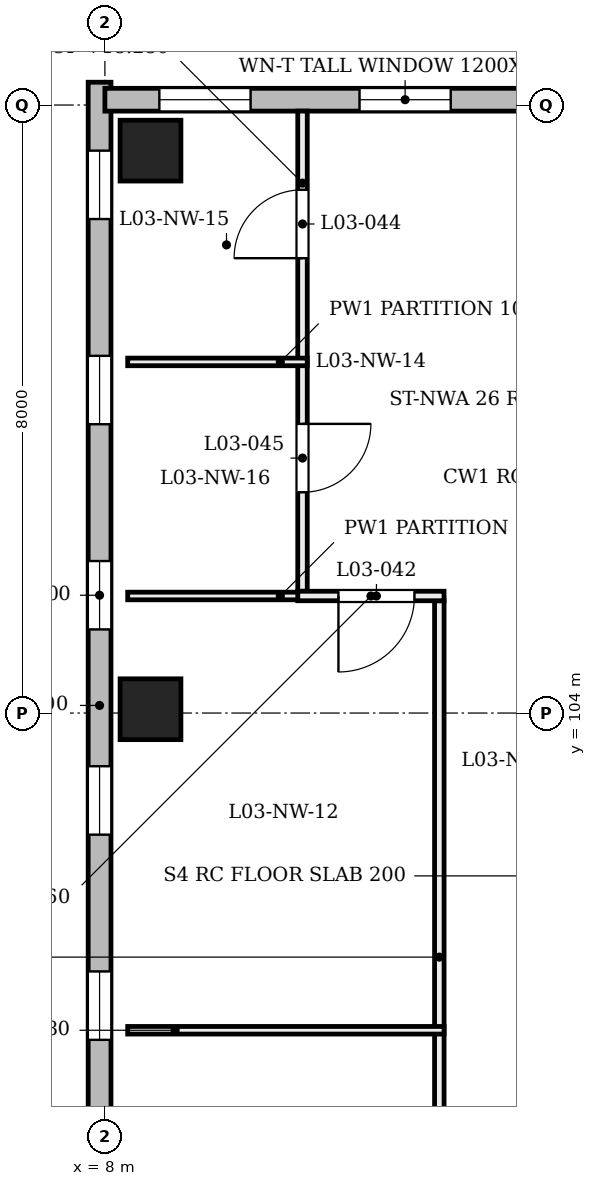
"""IFC4 building model, lengths in metres.
Left out: names, types, materials, properties, quantities, classifications, styles, units other than length and angle.
Written with IfcOpenShell. Run it as: python <this file> out.ifc"""

import sys

from ifc_helpers import new_model, si_unit, direction, frame, frame_2d, origin, origin_2d, place, context, subcontext, project, spatial, rectangle, extrude, element, fill, save


model = new_model("IFC4")
c1 = context("Model", 3, precision=1e-05, world=origin(), true_north=direction((0.0, 1.0)))
c2 = subcontext(c1, "Body", "Model", "MODEL_VIEW")
j1 = project(units=[si_unit("LENGTHUNIT", "METRE"), si_unit("PLANEANGLEUNIT", "RADIAN")], contexts=[c1])
p1 = place(None, origin())
s1 = spatial("IfcSite", under=j1, at=p1, CompositionType="ELEMENT")
p2 = place(p1, origin())
s2 = spatial("IfcBuilding", under=s1, at=p2, CompositionType="ELEMENT")
p3 = place(p2, frame((0.0, 0.0, 14.4)))
s3 = spatial("IfcBuildingStorey", under=s2, at=p3, CompositionType="ELEMENT", Elevation=14.4)
for number, where, z_axis, x_axis in (
    (1, (8.6, 104.05, 0.0), (0.0, 0.0, 1.0), (1.0, 0.0, 0.0)),
    (2, (8.6, 111.4, 0.0), (0.0, 0.0, 1.0), (1.0, 0.0, 0.0)),
):
    element("IfcColumn", number, at=place(p3, frame(where, z_axis=z_axis, x_axis=x_axis)), inside=s3, PredefinedType="COLUMN", context=c2, shape_type="SweptSolid", body=[
        extrude(rectangle(XDim=0.8, YDim=0.8, at=origin_2d()), origin(), (0.0, 0.0, 1.0), 4.8),
    ])
p4 = place(p3, frame((7.93, 95.9, 0.0), z_axis=(0.0, 0.0, 1.0), x_axis=(0.0, 1.0, 0.0)))
e3 = element("IfcWall", 3, at=p4, inside=s3, PredefinedType="SOLIDWALL", context=c2, shape_type="SweptSolid", body=[
    extrude(rectangle(XDim=16.4, YDim=0.3, at=frame_2d((8.2, 0.0))), origin(), (0.0, 0.0, 1.0), 3.9),
])
p5 = place(p4, frame((1.1, 0.0, 0.75)))
e4 = element("IfcOpeningElement", 4, at=p5, cuts=e3, PredefinedType="OPENING", context=c2, shape_type="SweptSolid", body=[
    extrude(rectangle(XDim=0.9, YDim=3.1, at=frame_2d((0.45, 1.55))), frame((0.0, 0.16, 0.0), z_axis=(0.0, -1.0, 0.0), x_axis=(1.0, 0.0, 0.0)), (0.0, 0.0, 1.0), 0.32),
])
p6 = place(p4, frame((3.8, 0.0, 0.75)))
e5 = element("IfcOpeningElement", 5, at=p6, cuts=e3, PredefinedType="OPENING", context=c2, shape_type="SweptSolid", body=[
    extrude(rectangle(XDim=0.9, YDim=3.1, at=frame_2d((0.45, 1.55))), frame((0.0, 0.16, 0.0), z_axis=(0.0, -1.0, 0.0), x_axis=(1.0, 0.0, 0.0)), (0.0, 0.0, 1.0), 0.32),
])
p7 = place(p4, frame((6.5, 0.0, 0.75)))
e6 = element("IfcOpeningElement", 6, at=p7, cuts=e3, PredefinedType="OPENING", context=c2, shape_type="SweptSolid", body=[
    extrude(rectangle(XDim=0.9, YDim=3.1, at=frame_2d((0.45, 1.55))), frame((0.0, 0.16, 0.0), z_axis=(0.0, -1.0, 0.0), x_axis=(1.0, 0.0, 0.0)), (0.0, 0.0, 1.0), 0.32),
])
p8 = place(p4, frame((9.2, 0.0, 0.75)))
e7 = element("IfcOpeningElement", 7, at=p8, cuts=e3, PredefinedType="OPENING", context=c2, shape_type="SweptSolid", body=[
    extrude(rectangle(XDim=0.9, YDim=3.1, at=frame_2d((0.45, 1.55))), frame((0.0, 0.16, 0.0), z_axis=(0.0, -1.0, 0.0), x_axis=(1.0, 0.0, 0.0)), (0.0, 0.0, 1.0), 0.32),
])
p9 = place(p4, frame((11.9, 0.0, 0.75)))
e8 = element("IfcOpeningElement", 8, at=p9, cuts=e3, PredefinedType="OPENING", context=c2, shape_type="SweptSolid", body=[
    extrude(rectangle(XDim=0.9, YDim=3.1, at=frame_2d((0.45, 1.55))), frame((0.0, 0.16, 0.0), z_axis=(0.0, -1.0, 0.0), x_axis=(1.0, 0.0, 0.0)), (0.0, 0.0, 1.0), 0.32),
])
p10 = place(p4, frame((14.6, 0.0, 0.75)))
e9 = element("IfcOpeningElement", 9, at=p10, cuts=e3, PredefinedType="OPENING", context=c2, shape_type="SweptSolid", body=[
    extrude(rectangle(XDim=0.9, YDim=3.1, at=frame_2d((0.45, 1.55))), frame((0.0, 0.16, 0.0), z_axis=(0.0, -1.0, 0.0), x_axis=(1.0, 0.0, 0.0)), (0.0, 0.0, 1.0), 0.32),
])
p11 = place(p3, frame((8.0, 112.07, 0.0), z_axis=(0.0, 0.0, 1.0), x_axis=(1.0, 0.0, 0.0)))
e10 = element("IfcWall", 10, at=p11, inside=s3, PredefinedType="SOLIDWALL", context=c2, shape_type="SweptSolid", body=[
    extrude(rectangle(XDim=7.9, YDim=0.3, at=frame_2d((3.95, 0.0))), origin(), (0.0, 0.0, 1.0), 3.9),
])
p12 = place(p11, frame((0.717, 0.0, 0.75)))
e11 = element("IfcOpeningElement", 11, at=p12, cuts=e10, PredefinedType="OPENING", context=c2, shape_type="SweptSolid", body=[
    extrude(rectangle(XDim=1.2, YDim=3.1, at=frame_2d((0.6, 1.55))), frame((0.0, 0.16, 0.0), z_axis=(0.0, -1.0, 0.0), x_axis=(1.0, 0.0, 0.0)), (0.0, 0.0, 1.0), 0.32),
])
p13 = place(p11, frame((3.35, 0.0, 0.75)))
e12 = element("IfcOpeningElement", 12, at=p13, cuts=e10, PredefinedType="OPENING", context=c2, shape_type="SweptSolid", body=[
    extrude(rectangle(XDim=1.2, YDim=3.1, at=frame_2d((0.6, 1.55))), frame((0.0, 0.16, 0.0), z_axis=(0.0, -1.0, 0.0), x_axis=(1.0, 0.0, 0.0)), (0.0, 0.0, 1.0), 0.32),
])
p14 = place(p11, frame((5.983, 0.0, 0.75)))
e13 = element("IfcOpeningElement", 13, at=p14, cuts=e10, PredefinedType="OPENING", context=c2, shape_type="SweptSolid", body=[
    extrude(rectangle(XDim=1.2, YDim=3.1, at=frame_2d((0.6, 1.55))), frame((0.0, 0.16, 0.0), z_axis=(0.0, -1.0, 0.0), x_axis=(1.0, 0.0, 0.0)), (0.0, 0.0, 1.0), 0.32),
])
p15 = place(p3, frame((12.4, 96.1, 0.0), z_axis=(0.0, 0.0, 1.0), x_axis=(0.0, 1.0, 0.0)))
e14 = element("IfcWall", 14, at=p15, inside=s3, PredefinedType="PARTITIONING", context=c2, shape_type="SweptSolid", body=[
    extrude(rectangle(XDim=9.377, YDim=0.125, at=frame_2d((4.688, 0.0))), origin(), (0.0, 0.0, 1.0), 3.88),
])
p16 = place(p15, frame((1.551, 0.0, 0.0)))
e15 = element("IfcOpeningElement", 15, at=p16, cuts=e14, PredefinedType="OPENING", context=c2, shape_type="SweptSolid", body=[
    extrude(rectangle(XDim=1.0, YDim=2.1, at=frame_2d((0.5, 1.05))), frame((0.0, 0.073, 0.0), z_axis=(0.0, -1.0, 0.0), x_axis=(1.0, 0.0, 0.0)), (0.0, 0.0, 1.0), 0.145),
])
p17 = place(p3, frame((10.6, 105.602, 0.0), z_axis=(0.0, 0.0, 1.0), x_axis=(0.0, 1.0, 0.0)))
e16 = element("IfcWall", 16, at=p17, inside=s3, PredefinedType="PARTITIONING", context=c2, shape_type="SweptSolid", body=[
    extrude(rectangle(XDim=6.318, YDim=0.125, at=frame_2d((3.159, 0.0))), origin(), (0.0, 0.0, 1.0), 3.88),
])
p18 = place(p17, frame((4.383, 0.0, 0.0)))
e17 = element("IfcOpeningElement", 17, at=p18, cuts=e16, PredefinedType="OPENING", context=c2, shape_type="SweptSolid", body=[
    extrude(rectangle(XDim=0.9, YDim=2.1, at=frame_2d((0.45, 1.05))), frame((0.0, 0.073, 0.0), z_axis=(0.0, -1.0, 0.0), x_axis=(1.0, 0.0, 0.0)), (0.0, 0.0, 1.0), 0.145),
])
p19 = place(p17, frame((1.302, 0.0, 0.0)))
e18 = element("IfcOpeningElement", 18, at=p19, cuts=e16, PredefinedType="OPENING", context=c2, shape_type="SweptSolid", body=[
    extrude(rectangle(XDim=0.9, YDim=2.1, at=frame_2d((0.45, 1.05))), frame((0.0, 0.073, 0.0), z_axis=(0.0, -1.0, 0.0), x_axis=(1.0, 0.0, 0.0)), (0.0, 0.0, 1.0), 0.145),
])
p20 = place(p3, frame((8.3, 99.826, 0.0), z_axis=(0.0, 0.0, 1.0), x_axis=(1.0, 0.0, 0.0)))
e19 = element("IfcWall", 19, at=p20, inside=s3, PredefinedType="PARTITIONING", context=c2, shape_type="SweptSolid", body=[
    extrude(rectangle(XDim=4.162, YDim=0.1, at=frame_2d((2.081, 0.0))), origin(), (0.0, 0.0, 1.0), 3.98),
])
p21 = place(p3, frame((8.3, 105.54, 0.0), z_axis=(0.0, 0.0, 1.0), x_axis=(1.0, 0.0, 0.0)))
e20 = element("IfcWall", 20, at=p21, inside=s3, PredefinedType="PARTITIONING", context=c2, shape_type="SweptSolid", body=[
    extrude(rectangle(XDim=2.363, YDim=0.1, at=frame_2d((1.181, 0.0))), origin(), (0.0, 0.0, 1.0), 3.98),
])
p22 = place(p3, frame((10.538, 105.54, 0.0), z_axis=(0.0, 0.0, 1.0), x_axis=(1.0, 0.0, 0.0)))
e21 = element("IfcWall", 21, at=p22, inside=s3, PredefinedType="PARTITIONING", context=c2, shape_type="SweptSolid", body=[
    extrude(rectangle(XDim=1.925, YDim=0.125, at=frame_2d((0.962, 0.0))), origin(), (0.0, 0.0, 1.0), 4.56),
])
p23 = place(p22, frame((0.535, 0.0, 0.0)))
e22 = element("IfcOpeningElement", 22, at=p23, cuts=e21, PredefinedType="OPENING", context=c2, shape_type="SweptSolid", body=[
    extrude(rectangle(XDim=1.0, YDim=2.1, at=frame_2d((0.5, 1.05))), frame((0.0, 0.073, 0.0), z_axis=(0.0, -1.0, 0.0), x_axis=(1.0, 0.0, 0.0)), (0.0, 0.0, 1.0), 0.145),
])
p24 = place(p3, frame((8.3, 108.62, 0.0), z_axis=(0.0, 0.0, 1.0), x_axis=(1.0, 0.0, 0.0)))
e23 = element("IfcWall", 23, at=p24, inside=s3, PredefinedType="PARTITIONING", context=c2, shape_type="SweptSolid", body=[
    extrude(rectangle(XDim=2.363, YDim=0.1, at=frame_2d((1.181, 0.0))), origin(), (0.0, 0.0, 1.0), 3.98),
])
p25 = place(p6, origin())
e24 = element("IfcWindow", 24, at=p25, inside=s3, PartitioningType="SINGLE_PANEL", PredefinedType="WINDOW", context=c2, shape_type="SweptSolid", body=[
    extrude(rectangle(XDim=0.9, YDim=3.1, at=frame_2d((0.45, 1.55))), frame((0.0, 0.03, 0.0), z_axis=(0.0, -1.0, 0.0), x_axis=(1.0, 0.0, 0.0)), (0.0, 0.0, 1.0), 0.06),
])
fill(e5, e24)
p26 = place(p7, origin())
e25 = element("IfcWindow", 25, at=p26, inside=s3, PartitioningType="SINGLE_PANEL", PredefinedType="WINDOW", context=c2, shape_type="SweptSolid", body=[
    extrude(rectangle(XDim=0.9, YDim=3.1, at=frame_2d((0.45, 1.55))), frame((0.0, 0.03, 0.0), z_axis=(0.0, -1.0, 0.0), x_axis=(1.0, 0.0, 0.0)), (0.0, 0.0, 1.0), 0.06),
])
fill(e6, e25)
p27 = place(p8, origin())
e26 = element("IfcWindow", 26, at=p27, inside=s3, PartitioningType="SINGLE_PANEL", PredefinedType="WINDOW", context=c2, shape_type="SweptSolid", body=[
    extrude(rectangle(XDim=0.9, YDim=3.1, at=frame_2d((0.45, 1.55))), frame((0.0, 0.03, 0.0), z_axis=(0.0, -1.0, 0.0), x_axis=(1.0, 0.0, 0.0)), (0.0, 0.0, 1.0), 0.06),
])
fill(e7, e26)
p28 = place(p9, origin())
e27 = element("IfcWindow", 27, at=p28, inside=s3, PartitioningType="SINGLE_PANEL", PredefinedType="WINDOW", context=c2, shape_type="SweptSolid", body=[
    extrude(rectangle(XDim=0.9, YDim=3.1, at=frame_2d((0.45, 1.55))), frame((0.0, 0.03, 0.0), z_axis=(0.0, -1.0, 0.0), x_axis=(1.0, 0.0, 0.0)), (0.0, 0.0, 1.0), 0.06),
])
fill(e8, e27)
p29 = place(p10, origin())
e28 = element("IfcWindow", 28, at=p29, inside=s3, PartitioningType="SINGLE_PANEL", PredefinedType="WINDOW", context=c2, shape_type="SweptSolid", body=[
    extrude(rectangle(XDim=0.9, YDim=3.1, at=frame_2d((0.45, 1.55))), frame((0.0, 0.03, 0.0), z_axis=(0.0, -1.0, 0.0), x_axis=(1.0, 0.0, 0.0)), (0.0, 0.0, 1.0), 0.06),
])
fill(e9, e28)
p30 = place(p12, origin())
e29 = element("IfcWindow", 29, at=p30, inside=s3, PartitioningType="SINGLE_PANEL", PredefinedType="WINDOW", context=c2, shape_type="SweptSolid", body=[
    extrude(rectangle(XDim=1.2, YDim=3.1, at=frame_2d((0.6, 1.55))), frame((0.0, 0.03, 0.0), z_axis=(0.0, -1.0, 0.0), x_axis=(1.0, 0.0, 0.0)), (0.0, 0.0, 1.0), 0.06),
])
fill(e11, e29)
p31 = place(p13, origin())
e30 = element("IfcWindow", 30, at=p31, inside=s3, PartitioningType="SINGLE_PANEL", PredefinedType="WINDOW", context=c2, shape_type="SweptSolid", body=[
    extrude(rectangle(XDim=1.2, YDim=3.1, at=frame_2d((0.6, 1.55))), frame((0.0, 0.03, 0.0), z_axis=(0.0, -1.0, 0.0), x_axis=(1.0, 0.0, 0.0)), (0.0, 0.0, 1.0), 0.06),
])
fill(e12, e30)
p32 = place(p23, frame((1.0, 0.0, 0.0), z_axis=(0.0, 0.0, 1.0), x_axis=(-1.0, 0.0, 0.0)))
e31 = element("IfcDoor", 31, at=p32, inside=s3, OperationType="SINGLE_SWING_LEFT", PredefinedType="DOOR", context=c2, shape_type="SweptSolid", body=[
    extrude(rectangle(XDim=1.0, YDim=2.1, at=frame_2d((0.5, 1.05))), frame((0.0, 0.025, 0.0), z_axis=(0.0, -1.0, 0.0), x_axis=(1.0, 0.0, 0.0)), (0.0, 0.0, 1.0), 0.05),
])
fill(e22, e31)
p33 = place(p18, origin())
e32 = element("IfcDoor", 32, at=p33, inside=s3, OperationType="SINGLE_SWING_LEFT", PredefinedType="DOOR", context=c2, shape_type="SweptSolid", body=[
    extrude(rectangle(XDim=0.9, YDim=2.1, at=frame_2d((0.45, 1.05))), frame((0.0, 0.025, 0.0), z_axis=(0.0, -1.0, 0.0), x_axis=(1.0, 0.0, 0.0)), (0.0, 0.0, 1.0), 0.05),
])
fill(e17, e32)
p34 = place(p19, origin())
e33 = element("IfcDoor", 33, at=p34, inside=s3, OperationType="SINGLE_SWING_RIGHT", PredefinedType="DOOR", context=c2, shape_type="SweptSolid", body=[
    extrude(rectangle(XDim=0.9, YDim=2.1, at=frame_2d((0.45, 1.05))), frame((0.0, 0.025, 0.0), z_axis=(0.0, -1.0, 0.0), x_axis=(1.0, 0.0, 0.0)), (0.0, 0.0, 1.0), 0.05),
])
fill(e18, e33)
save(model, sys.argv[1])
